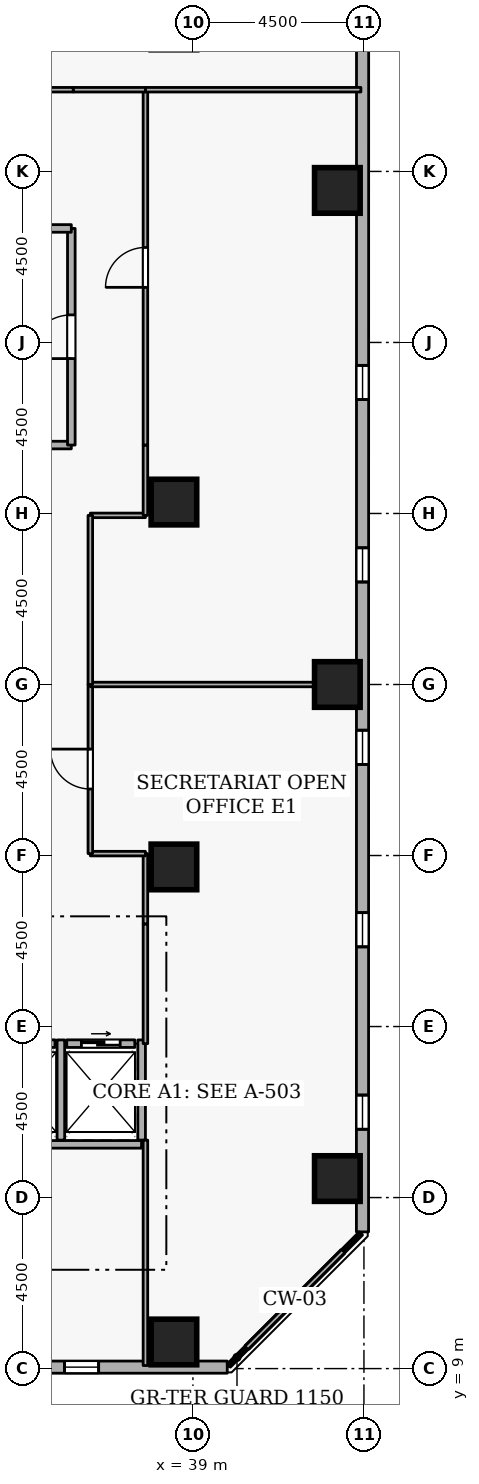
"""IFC4 building model, lengths in metres.
Left out: names, types, materials, properties, quantities, classifications, styles, units other than length and angle.
Written with IfcOpenShell. Run it as: python <this file> out.ifc"""

import sys

from ifc_helpers import new_model, si_unit, direction, frame, frame_2d, origin, origin_2d, place, context, subcontext, project, spatial, rectangle, extrude, element, fill, save


model = new_model("IFC4")
c1 = context("Model", 3, precision=1e-05, world=origin(), true_north=direction((0.0, 1.0)))
c2 = subcontext(c1, "Body", "Model", "MODEL_VIEW")
j1 = project(units=[si_unit("LENGTHUNIT", "METRE"), si_unit("PLANEANGLEUNIT", "RADIAN")], contexts=[c1])
p1 = place(None, origin())
s1 = spatial("IfcSite", under=j1, at=p1, CompositionType="ELEMENT")
p2 = place(p1, origin())
s2 = spatial("IfcBuilding", under=s1, at=p2, CompositionType="ELEMENT")
p3 = place(p2, frame((0.0, 0.0, 105.3)))
s3 = spatial("IfcBuildingStorey", under=s2, at=p3, CompositionType="ELEMENT", Elevation=105.3)
for number, where, z_axis, x_axis in (
    (1, (38.5, 9.7, 0.0), (0.0, 0.0, 1.0), (1.0, 0.0, 0.0)),
    (2, (42.8, 14.0, 0.0), (0.0, 0.0, 1.0), (1.0, 0.0, 0.0)),
    (3, (42.8, 27.0, 0.0), (0.0, 0.0, 1.0), (1.0, 0.0, 0.0)),
    (4, (42.8, 40.0, 0.0), (0.0, 0.0, 1.0), (1.0, 0.0, 0.0)),
    (5, (38.5, 22.2, 0.0), (0.0, 0.0, 1.0), (1.0, 0.0, 0.0)),
    (6, (38.5, 31.8, 0.0), (0.0, 0.0, 1.0), (1.0, 0.0, 0.0)),
):
    element("IfcColumn", number, at=place(p3, frame(where, z_axis=z_axis, x_axis=x_axis)), inside=s3, PredefinedType="COLUMN", context=c2, shape_type="SweptSolid", body=[
        extrude(rectangle(XDim=1.2, YDim=1.2, at=origin_2d()), origin(), (0.0, 0.0, 1.0), 3.6),
    ])
p4 = place(p3, frame((4.119, 9.035, 0.0), z_axis=(0.0, 0.0, 1.0), x_axis=(0.999999996067, 8.8693006e-05, 0.0)))
e7 = element("IfcWall", 7, at=p4, inside=s3, PredefinedType="STANDARD", context=c2, shape_type="SweptSolid", body=[
    extrude(rectangle(XDim=35.784, YDim=0.32, at=frame_2d((17.892, 0.0))), origin(), (0.0, 0.0, 1.0), 2.7),
])
p5 = place(p4, frame((2.7, 0.0, 0.72)))
e8 = element("IfcOpeningElement", 8, at=p5, cuts=e7, PredefinedType="OPENING", context=c2, shape_type="SweptSolid", body=[
    extrude(rectangle(XDim=0.9, YDim=1.75, at=frame_2d((0.45, 0.875))), frame((0.0, 0.17, 0.0), z_axis=(0.0, -1.0, 0.0), x_axis=(1.0, 0.0, 0.0)), (0.0, 0.0, 1.0), 0.34),
])
p6 = place(p4, frame((12.3, 0.0, 0.72)))
e9 = element("IfcOpeningElement", 9, at=p6, cuts=e7, PredefinedType="OPENING", context=c2, shape_type="SweptSolid", body=[
    extrude(rectangle(XDim=0.9, YDim=1.75, at=frame_2d((0.45, 0.875))), frame((0.0, 0.17, 0.0), z_axis=(0.0, -1.0, 0.0), x_axis=(1.0, 0.0, 0.0)), (0.0, 0.0, 1.0), 0.34),
])
p7 = place(p4, frame((17.1, 0.0, 0.72)))
e10 = element("IfcOpeningElement", 10, at=p7, cuts=e7, PredefinedType="OPENING", context=c2, shape_type="SweptSolid", body=[
    extrude(rectangle(XDim=0.9, YDim=1.75, at=frame_2d((0.45, 0.875))), frame((0.0, 0.17, 0.0), z_axis=(0.0, -1.0, 0.0), x_axis=(1.0, 0.0, 0.0)), (0.0, 0.0, 1.0), 0.34),
])
p8 = place(p4, frame((26.7, 0.0, 0.72)))
e11 = element("IfcOpeningElement", 11, at=p8, cuts=e7, PredefinedType="OPENING", context=c2, shape_type="SweptSolid", body=[
    extrude(rectangle(XDim=0.9, YDim=1.75, at=frame_2d((0.45, 0.875))), frame((0.0, 0.17, 0.0), z_axis=(0.0, -1.0, 0.0), x_axis=(1.0, 0.0, 0.0)), (0.0, 0.0, 1.0), 0.34),
])
p9 = place(p4, frame((31.5, 0.0, 0.72)))
e12 = element("IfcOpeningElement", 12, at=p9, cuts=e7, PredefinedType="OPENING", context=c2, shape_type="SweptSolid", body=[
    extrude(rectangle(XDim=0.9, YDim=1.75, at=frame_2d((0.45, 0.875))), frame((0.0, 0.17, 0.0), z_axis=(0.0, -1.0, 0.0), x_axis=(1.0, 0.0, 0.0)), (0.0, 0.0, 1.0), 0.34),
])
p10 = place(p3, frame((43.461, 12.597, 0.0), z_axis=(0.0, 0.0, 1.0), x_axis=(8.8693006e-05, 0.999999996067, 0.0)))
e13 = element("IfcWall", 13, at=p10, inside=s3, PredefinedType="STANDARD", context=c2, shape_type="SweptSolid", body=[
    extrude(rectangle(XDim=35.784, YDim=0.32, at=frame_2d((17.892, 0.0))), origin(), (0.0, 0.0, 1.0), 2.7),
])
p11 = place(p10, frame((2.7, 0.0, 0.72)))
e14 = element("IfcOpeningElement", 14, at=p11, cuts=e13, PredefinedType="OPENING", context=c2, shape_type="SweptSolid", body=[
    extrude(rectangle(XDim=0.9, YDim=1.75, at=frame_2d((0.45, 0.875))), frame((0.0, 0.17, 0.0), z_axis=(0.0, -1.0, 0.0), x_axis=(1.0, 0.0, 0.0)), (0.0, 0.0, 1.0), 0.34),
])
p12 = place(p10, frame((7.5, 0.0, 0.72)))
e15 = element("IfcOpeningElement", 15, at=p12, cuts=e13, PredefinedType="OPENING", context=c2, shape_type="SweptSolid", body=[
    extrude(rectangle(XDim=0.9, YDim=1.75, at=frame_2d((0.45, 0.875))), frame((0.0, 0.17, 0.0), z_axis=(0.0, -1.0, 0.0), x_axis=(1.0, 0.0, 0.0)), (0.0, 0.0, 1.0), 0.34),
])
p13 = place(p10, frame((12.3, 0.0, 0.72)))
e16 = element("IfcOpeningElement", 16, at=p13, cuts=e13, PredefinedType="OPENING", context=c2, shape_type="SweptSolid", body=[
    extrude(rectangle(XDim=0.9, YDim=1.75, at=frame_2d((0.45, 0.875))), frame((0.0, 0.17, 0.0), z_axis=(0.0, -1.0, 0.0), x_axis=(1.0, 0.0, 0.0)), (0.0, 0.0, 1.0), 0.34),
])
p14 = place(p10, frame((17.1, 0.0, 0.72)))
e17 = element("IfcOpeningElement", 17, at=p14, cuts=e13, PredefinedType="OPENING", context=c2, shape_type="SweptSolid", body=[
    extrude(rectangle(XDim=0.9, YDim=1.75, at=frame_2d((0.45, 0.875))), frame((0.0, 0.17, 0.0), z_axis=(0.0, -1.0, 0.0), x_axis=(1.0, 0.0, 0.0)), (0.0, 0.0, 1.0), 0.34),
])
p15 = place(p10, frame((21.9, 0.0, 0.72)))
e18 = element("IfcOpeningElement", 18, at=p15, cuts=e13, PredefinedType="OPENING", context=c2, shape_type="SweptSolid", body=[
    extrude(rectangle(XDim=0.9, YDim=1.75, at=frame_2d((0.45, 0.875))), frame((0.0, 0.17, 0.0), z_axis=(0.0, -1.0, 0.0), x_axis=(1.0, 0.0, 0.0)), (0.0, 0.0, 1.0), 0.34),
])
p16 = place(p10, frame((31.5, 0.0, 0.72)))
e19 = element("IfcOpeningElement", 19, at=p16, cuts=e13, PredefinedType="OPENING", context=c2, shape_type="SweptSolid", body=[
    extrude(rectangle(XDim=0.9, YDim=1.75, at=frame_2d((0.45, 0.875))), frame((0.0, 0.17, 0.0), z_axis=(0.0, -1.0, 0.0), x_axis=(1.0, 0.0, 0.0)), (0.0, 0.0, 1.0), 0.34),
])
p17 = place(p3, frame((33.63, 17.55, 0.0), z_axis=(0.0, 0.0, 1.0), x_axis=(1.0, 0.0, 0.0)))
e20 = element("IfcWall", 20, at=p17, inside=s3, PredefinedType="STANDARD", context=c2, shape_type="SweptSolid", body=[
    extrude(rectangle(XDim=1.74, YDim=0.2, at=frame_2d((0.87, 0.0))), origin(), (0.0, 0.0, 1.0), 3.34),
])
p18 = place(p17, frame((0.36, 0.0, 0.0)))
e21 = element("IfcOpeningElement", 21, at=p18, cuts=e20, PredefinedType="OPENING", context=c2, shape_type="SweptSolid", body=[
    extrude(rectangle(XDim=1.02, YDim=2.06, at=frame_2d((0.51, 1.03))), frame((0.0, 0.11, 0.0), z_axis=(0.0, -1.0, 0.0), x_axis=(1.0, 0.0, 0.0)), (0.0, 0.0, 1.0), 0.22),
])
p19 = place(p3, frame((35.68, 17.55, 0.0), z_axis=(0.0, 0.0, 1.0), x_axis=(1.0, 0.0, 0.0)))
e22 = element("IfcWall", 22, at=p19, inside=s3, PredefinedType="STANDARD", context=c2, shape_type="SweptSolid", body=[
    extrude(rectangle(XDim=1.79, YDim=0.2, at=frame_2d((0.895, 0.0))), origin(), (0.0, 0.0, 1.0), 3.34),
])
p20 = place(p19, frame((0.385, 0.0, 0.0)))
e23 = element("IfcOpeningElement", 23, at=p20, cuts=e22, PredefinedType="OPENING", context=c2, shape_type="SweptSolid", body=[
    extrude(rectangle(XDim=1.02, YDim=2.06, at=frame_2d((0.51, 1.03))), frame((0.0, 0.11, 0.0), z_axis=(0.0, -1.0, 0.0), x_axis=(1.0, 0.0, 0.0)), (0.0, 0.0, 1.0), 0.22),
])
p21 = place(p3, frame((33.452, 14.9, 0.0), z_axis=(0.0, 0.0, 1.0), x_axis=(1.0, 0.0, 0.0)))
e24 = element("IfcWall", 24, at=p21, inside=s3, PredefinedType="STANDARD", context=c2, shape_type="SweptSolid", body=[
    extrude(rectangle(XDim=4.196, YDim=0.2, at=frame_2d((2.098, 0.0))), origin(), (0.0, 0.0, 1.0), 3.34),
])
for number, where, z_axis, x_axis in (
    (25, (35.525, 15.012, 0.0), (0.0, 0.0, 1.0), (0.0, 1.0, 0.0)),
    (26, (37.65, 15.012, 0.0), (0.0, 0.0, 1.0), (0.0, 1.0, 0.0)),
):
    element("IfcWall", number, at=place(p3, frame(where, z_axis=z_axis, x_axis=x_axis)), inside=s3, PredefinedType="STANDARD", context=c2, shape_type="SweptSolid", body=[
        extrude(rectangle(XDim=2.636, YDim=0.2, at=frame_2d((1.318, 0.0))), origin(), (0.0, 0.0, 1.0), 3.34),
    ])
p22 = place(p3, frame((33.3, 33.3, 0.0), z_axis=(0.0, 0.0, 1.0), x_axis=(1.0, 0.0, 0.0)))
e27 = element("IfcWall", 27, at=p22, inside=s3, PredefinedType="STANDARD", context=c2, shape_type="SweptSolid", body=[
    extrude(rectangle(XDim=2.5, YDim=0.2, at=frame_2d((1.25, 0.0))), origin(), (0.0, 0.0, 1.0), 3.34),
])
p23 = place(p3, frame((35.8, 33.3, 0.0), z_axis=(0.0, 0.0, 1.0), x_axis=(0.0, 1.0, 0.0)))
e28 = element("IfcWall", 28, at=p23, inside=s3, PredefinedType="STANDARD", context=c2, shape_type="SweptSolid", body=[
    extrude(rectangle(XDim=5.7, YDim=0.2, at=frame_2d((2.85, 0.0))), origin(), (0.0, 0.0, 1.0), 3.34),
])
p24 = place(p23, frame((2.275, 0.0, 0.0)))
e29 = element("IfcOpeningElement", 29, at=p24, cuts=e28, PredefinedType="OPENING", context=c2, shape_type="SweptSolid", body=[
    extrude(rectangle(XDim=1.15, YDim=2.1, at=frame_2d((0.575, 1.05))), frame((0.0, 0.11, 0.0), z_axis=(0.0, -1.0, 0.0), x_axis=(1.0, 0.0, 0.0)), (0.0, 0.0, 1.0), 0.22),
])
p25 = place(p3, frame((35.8, 39.0, 0.0), z_axis=(0.0, 0.0, 1.0), x_axis=(-1.0, 0.0, 0.0)))
e30 = element("IfcWall", 30, at=p25, inside=s3, PredefinedType="STANDARD", context=c2, shape_type="SweptSolid", body=[
    extrude(rectangle(XDim=2.5, YDim=0.2, at=frame_2d((1.25, 0.0))), origin(), (0.0, 0.0, 1.0), 3.34),
])
p26 = place(p3, frame((37.75, 17.55, 0.0), z_axis=(0.0, 0.0, 1.0), x_axis=(0.0, 1.0, 0.0)))
e31 = element("IfcWall", 31, at=p26, inside=s3, PredefinedType="PARTITIONING", context=c2, shape_type="SweptSolid", body=[
    extrude(rectangle(XDim=3.15, YDim=0.12, at=frame_2d((1.575, 0.0))), origin(), (0.0, 0.0, 1.0), 3.34),
])
p27 = place(p3, frame((37.75, 20.7, 0.0), z_axis=(0.0, 0.0, 1.0), x_axis=(0.0, 1.0, 0.0)))
e32 = element("IfcWall", 32, at=p27, inside=s3, PredefinedType="PARTITIONING", context=c2, shape_type="SweptSolid", body=[
    extrude(rectangle(XDim=1.85, YDim=0.12, at=frame_2d((0.925, 0.0))), origin(), (0.0, 0.0, 1.0), 3.34),
])
p28 = place(p3, frame((37.75, 22.55, 0.0), z_axis=(0.0, 0.0, 1.0), x_axis=(-1.0, 0.0, 0.0)))
e33 = element("IfcWall", 33, at=p28, inside=s3, PredefinedType="PARTITIONING", context=c2, shape_type="SweptSolid", body=[
    extrude(rectangle(XDim=1.45, YDim=0.12, at=frame_2d((0.725, 0.0))), origin(), (0.0, 0.0, 1.0), 3.34),
])
p29 = place(p3, frame((36.3, 22.55, 0.0), z_axis=(0.0, 0.0, 1.0), x_axis=(0.0, 1.0, 0.0)))
e34 = element("IfcWall", 34, at=p29, inside=s3, PredefinedType="PARTITIONING", context=c2, shape_type="SweptSolid", body=[
    extrude(rectangle(XDim=4.45, YDim=0.12, at=frame_2d((2.225, 0.0))), origin(), (0.0, 0.0, 1.0), 3.34),
])
p30 = place(p29, frame((1.7, 0.0, 0.0)))
e35 = element("IfcOpeningElement", 35, at=p30, cuts=e34, PredefinedType="OPENING", context=c2, shape_type="SweptSolid", body=[
    extrude(rectangle(XDim=1.05, YDim=2.1, at=frame_2d((0.525, 1.05))), frame((0.0, 0.07, 0.0), z_axis=(0.0, -1.0, 0.0), x_axis=(1.0, 0.0, 0.0)), (0.0, 0.0, 1.0), 0.14),
])
p31 = place(p3, frame((36.3, 27.0, 0.0), z_axis=(0.0, 0.0, 1.0), x_axis=(1.0, 0.0, 0.0)))
e36 = element("IfcWall", 36, at=p31, inside=s3, PredefinedType="PARTITIONING", context=c2, shape_type="SweptSolid", body=[
    extrude(rectangle(XDim=7.12, YDim=0.12, at=frame_2d((3.56, 0.0))), origin(), (0.0, 0.0, 1.0), 2.878),
])
p32 = place(p3, frame((43.42, 12.557, 0.0), z_axis=(0.0, 0.0, 1.0), x_axis=(-0.707106781187, -0.707106781187, 0.0)))
e37 = element("IfcWall", 37, at=p32, inside=s3, PredefinedType="PARTITIONING", context=c2, shape_type="SweptSolid", body=[
    extrude(rectangle(XDim=4.917, YDim=0.12, at=frame_2d((2.458, 0.0))), origin(), (0.0, 0.0, 1.0), 3.34),
])
p33 = place(p3, frame((37.75, 9.08, 0.0), z_axis=(0.0, 0.0, 1.0), x_axis=(0.0, 1.0, 0.0)))
e38 = element("IfcWall", 38, at=p33, inside=s3, PredefinedType="PARTITIONING", context=c2, shape_type="SweptSolid", body=[
    extrude(rectangle(XDim=5.932, YDim=0.12, at=frame_2d((2.966, 0.0))), origin(), (0.0, 0.0, 1.0), 3.34),
])
p34 = place(p3, frame((36.3, 31.45, 0.0), z_axis=(0.0, 0.0, 1.0), x_axis=(1.0, 0.0, 0.0)))
e39 = element("IfcWall", 39, at=p34, inside=s3, PredefinedType="PARTITIONING", context=c2, shape_type="SweptSolid", body=[
    extrude(rectangle(XDim=1.45, YDim=0.12, at=frame_2d((0.725, 0.0))), origin(), (0.0, 0.0, 1.0), 3.34),
])
p35 = place(p3, frame((37.75, 31.45, 0.0), z_axis=(0.0, 0.0, 1.0), x_axis=(0.0, 1.0, 0.0)))
e40 = element("IfcWall", 40, at=p35, inside=s3, PredefinedType="PARTITIONING", context=c2, shape_type="SweptSolid", body=[
    extrude(rectangle(XDim=1.85, YDim=0.12, at=frame_2d((0.925, 0.0))), origin(), (0.0, 0.0, 1.0), 3.34),
])
p36 = place(p3, frame((37.75, 33.3, 0.0), z_axis=(0.0, 0.0, 1.0), x_axis=(0.0, 1.0, 0.0)))
e41 = element("IfcWall", 41, at=p36, inside=s3, PredefinedType="PARTITIONING", context=c2, shape_type="SweptSolid", body=[
    extrude(rectangle(XDim=9.35, YDim=0.12, at=frame_2d((4.675, 0.0))), origin(), (0.0, 0.0, 1.0), 3.34),
])
p37 = place(p36, frame((4.15, 0.0, 0.0)))
e42 = element("IfcOpeningElement", 42, at=p37, cuts=e41, PredefinedType="OPENING", context=c2, shape_type="SweptSolid", body=[
    extrude(rectangle(XDim=1.05, YDim=2.1, at=frame_2d((0.525, 1.05))), frame((0.0, 0.07, 0.0), z_axis=(0.0, -1.0, 0.0), x_axis=(1.0, 0.0, 0.0)), (0.0, 0.0, 1.0), 0.14),
])
p38 = place(p3, frame((37.75, 42.65, 0.0), z_axis=(0.0, 0.0, 1.0), x_axis=(1.0, 0.0, 0.0)))
e43 = element("IfcWall", 43, at=p38, inside=s3, PredefinedType="PARTITIONING", context=c2, shape_type="SweptSolid", body=[
    extrude(rectangle(XDim=5.67, YDim=0.12, at=frame_2d((2.835, 0.0))), origin(), (0.0, 0.0, 1.0), 3.34),
])
p39 = place(p3, frame((36.3, 27.0, 0.0), z_axis=(0.0, 0.0, 1.0), x_axis=(0.0, 1.0, 0.0)))
e44 = element("IfcWall", 44, at=p39, inside=s3, PredefinedType="PARTITIONING", context=c2, shape_type="SweptSolid", body=[
    extrude(rectangle(XDim=4.45, YDim=0.12, at=frame_2d((2.225, 0.0))), origin(), (0.0, 0.0, 1.0), 3.34),
])
p40 = place(p3, frame((37.75, 42.65, 0.0), z_axis=(0.0, 0.0, 1.0), x_axis=(-1.0, 0.0, 0.0)))
e45 = element("IfcWall", 45, at=p40, inside=s3, PredefinedType="PARTITIONING", context=c2, shape_type="SweptSolid", body=[
    extrude(rectangle(XDim=1.9, YDim=0.12, at=frame_2d((0.95, 0.0))), origin(), (0.0, 0.0, 1.0), 3.34),
])
p41 = place(p3, frame((35.85, 42.65, 0.0), z_axis=(0.0, 0.0, 1.0), x_axis=(-1.0, 0.0, 0.0)))
e46 = element("IfcWall", 46, at=p41, inside=s3, PredefinedType="PARTITIONING", context=c2, shape_type="SweptSolid", body=[
    extrude(rectangle(XDim=10.35, YDim=0.12, at=frame_2d((5.175, 0.0))), origin(), (0.0, 0.0, 1.0), 2.895),
])
p42 = place(p41, frame((4.65, 0.0, 0.0)))
e47 = element("IfcOpeningElement", 47, at=p42, cuts=e46, PredefinedType="OPENING", context=c2, shape_type="SweptSolid", body=[
    extrude(rectangle(XDim=1.05, YDim=2.1, at=frame_2d((0.525, 1.05))), frame((0.0, 0.07, 0.0), z_axis=(0.0, -1.0, 0.0), x_axis=(1.0, 0.0, 0.0)), (0.0, 0.0, 1.0), 0.14),
])
p43 = place(p9, origin())
e48 = element("IfcWindow", 48, at=p43, inside=s3, PartitioningType="SINGLE_PANEL", PredefinedType="WINDOW", context=c2, shape_type="SweptSolid", body=[
    extrude(rectangle(XDim=0.9, YDim=1.75, at=frame_2d((0.45, 0.875))), frame((0.0, 0.03, 0.0), z_axis=(0.0, -1.0, 0.0), x_axis=(1.0, 0.0, 0.0)), (0.0, 0.0, 1.0), 0.06),
])
fill(e12, e48)
p44 = place(p11, origin())
e49 = element("IfcWindow", 49, at=p44, inside=s3, PartitioningType="SINGLE_PANEL", PredefinedType="WINDOW", context=c2, shape_type="SweptSolid", body=[
    extrude(rectangle(XDim=0.9, YDim=1.75, at=frame_2d((0.45, 0.875))), frame((0.0, 0.03, 0.0), z_axis=(0.0, -1.0, 0.0), x_axis=(1.0, 0.0, 0.0)), (0.0, 0.0, 1.0), 0.06),
])
fill(e14, e49)
p45 = place(p12, origin())
e50 = element("IfcWindow", 50, at=p45, inside=s3, PartitioningType="SINGLE_PANEL", PredefinedType="WINDOW", context=c2, shape_type="SweptSolid", body=[
    extrude(rectangle(XDim=0.9, YDim=1.75, at=frame_2d((0.45, 0.875))), frame((0.0, 0.03, 0.0), z_axis=(0.0, -1.0, 0.0), x_axis=(1.0, 0.0, 0.0)), (0.0, 0.0, 1.0), 0.06),
])
fill(e15, e50)
p46 = place(p13, origin())
e51 = element("IfcWindow", 51, at=p46, inside=s3, PartitioningType="SINGLE_PANEL", PredefinedType="WINDOW", context=c2, shape_type="SweptSolid", body=[
    extrude(rectangle(XDim=0.9, YDim=1.75, at=frame_2d((0.45, 0.875))), frame((0.0, 0.03, 0.0), z_axis=(0.0, -1.0, 0.0), x_axis=(1.0, 0.0, 0.0)), (0.0, 0.0, 1.0), 0.06),
])
fill(e16, e51)
p47 = place(p14, origin())
e52 = element("IfcWindow", 52, at=p47, inside=s3, PartitioningType="SINGLE_PANEL", PredefinedType="WINDOW", context=c2, shape_type="SweptSolid", body=[
    extrude(rectangle(XDim=0.9, YDim=1.75, at=frame_2d((0.45, 0.875))), frame((0.0, 0.03, 0.0), z_axis=(0.0, -1.0, 0.0), x_axis=(1.0, 0.0, 0.0)), (0.0, 0.0, 1.0), 0.06),
])
fill(e17, e52)
p48 = place(p15, origin())
e53 = element("IfcWindow", 53, at=p48, inside=s3, PartitioningType="SINGLE_PANEL", PredefinedType="WINDOW", context=c2, shape_type="SweptSolid", body=[
    extrude(rectangle(XDim=0.9, YDim=1.75, at=frame_2d((0.45, 0.875))), frame((0.0, 0.03, 0.0), z_axis=(0.0, -1.0, 0.0), x_axis=(1.0, 0.0, 0.0)), (0.0, 0.0, 1.0), 0.06),
])
fill(e18, e53)
p49 = place(p20, origin())
e54 = element("IfcDoor", 54, at=p49, inside=s3, OperationType="SLIDING_TO_LEFT", PredefinedType="DOOR", context=c2, shape_type="SweptSolid", body=[
    extrude(rectangle(XDim=1.02, YDim=2.06, at=frame_2d((0.51, 1.03))), frame((0.0, 0.025, 0.0), z_axis=(0.0, -1.0, 0.0), x_axis=(1.0, 0.0, 0.0)), (0.0, 0.0, 1.0), 0.05),
])
fill(e23, e54)
p50 = place(p24, origin())
e55 = element("IfcDoor", 55, at=p50, inside=s3, OperationType="SINGLE_SWING_LEFT", PredefinedType="DOOR", context=c2, shape_type="SweptSolid", body=[
    extrude(rectangle(XDim=1.15, YDim=2.1, at=frame_2d((0.575, 1.05))), frame((0.0, 0.025, 0.0), z_axis=(0.0, -1.0, 0.0), x_axis=(1.0, 0.0, 0.0)), (0.0, 0.0, 1.0), 0.05),
])
fill(e29, e55)
p51 = place(p30, origin())
e56 = element("IfcDoor", 56, at=p51, inside=s3, OperationType="SINGLE_SWING_RIGHT", PredefinedType="DOOR", context=c2, shape_type="SweptSolid", body=[
    extrude(rectangle(XDim=1.05, YDim=2.1, at=frame_2d((0.525, 1.05))), frame((0.0, 0.025, 0.0), z_axis=(0.0, -1.0, 0.0), x_axis=(1.0, 0.0, 0.0)), (0.0, 0.0, 1.0), 0.05),
])
fill(e35, e56)
p52 = place(p37, origin())
e57 = element("IfcDoor", 57, at=p52, inside=s3, OperationType="SINGLE_SWING_LEFT", PredefinedType="DOOR", context=c2, shape_type="SweptSolid", body=[
    extrude(rectangle(XDim=1.05, YDim=2.1, at=frame_2d((0.525, 1.05))), frame((0.0, 0.025, 0.0), z_axis=(0.0, -1.0, 0.0), x_axis=(1.0, 0.0, 0.0)), (0.0, 0.0, 1.0), 0.05),
])
fill(e42, e57)
save(model, sys.argv[1])
